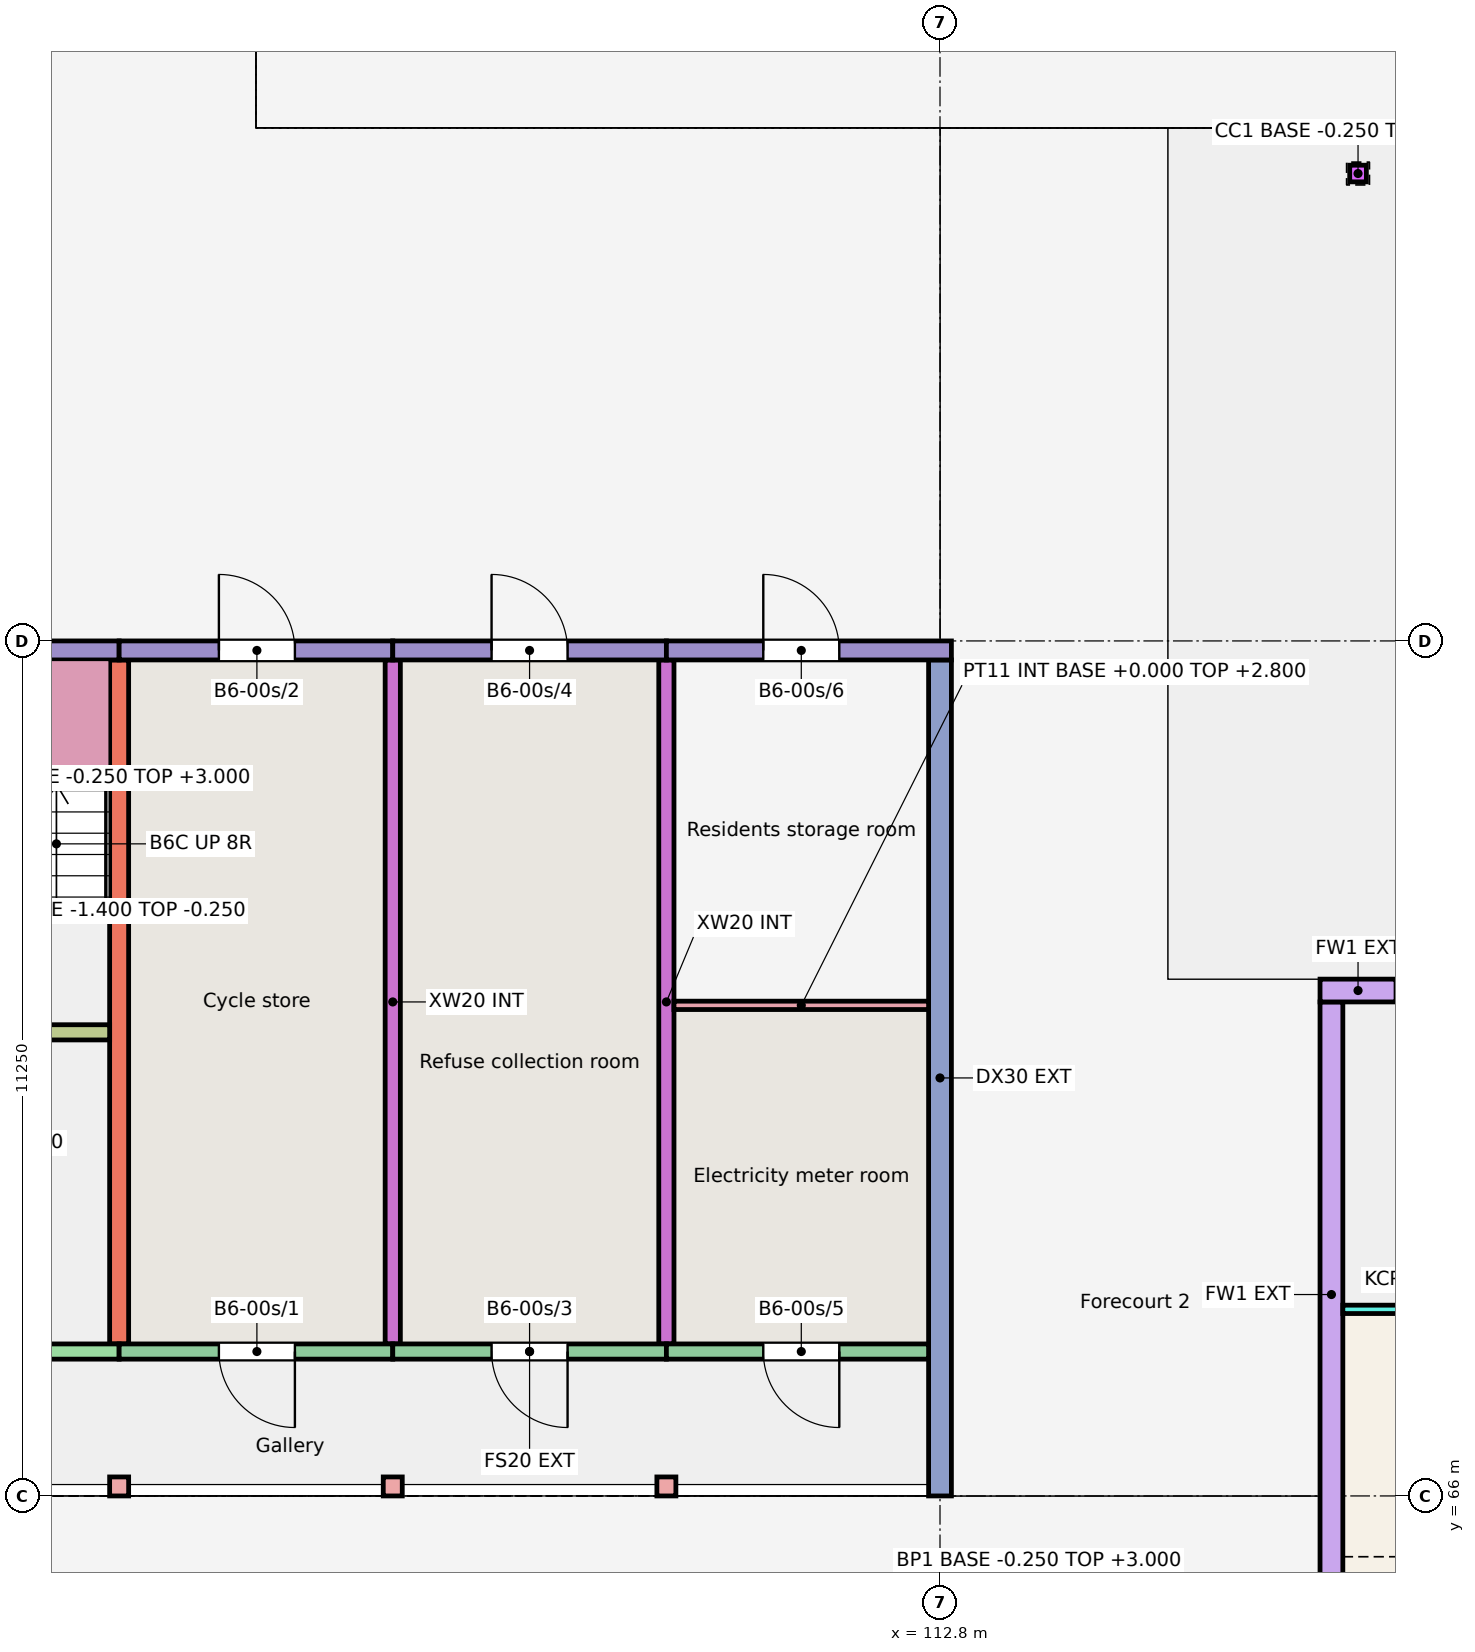
"""IFC4 building model, lengths in metres.
Left out: names, types, materials, properties, quantities, classifications, styles, units other than length and angle.
Written with IfcOpenShell. Run it as: python <this file> out.ifc"""

import sys

from ifc_helpers import new_model, si_unit, direction, frame, frame_2d, origin, origin_2d, place, context, subcontext, project, spatial, rectangle, hollow_circle, extrude, element, fill, save


model = new_model("IFC4")
c1 = context("Model", 3, precision=1e-05, world=origin(), true_north=direction((0.0, 1.0)))
c2 = subcontext(c1, "Body", "Model", "MODEL_VIEW")
j1 = project(units=[si_unit("LENGTHUNIT", "METRE"), si_unit("PLANEANGLEUNIT", "RADIAN")], contexts=[c1])
p1 = place(None, origin())
s1 = spatial("IfcSite", under=j1, at=p1, CompositionType="ELEMENT")
p2 = place(p1, origin())
s2 = spatial("IfcBuilding", under=s1, at=p2, CompositionType="ELEMENT")
p3 = place(p2, origin())
s3 = spatial("IfcBuildingStorey", under=s2, at=p3, CompositionType="ELEMENT", Elevation=0.0)
p4 = place(p3, frame((102.0, 68.0, -0.25), z_axis=(0.0, 0.0, 1.0), x_axis=(0.0, 1.0, 0.0)))
e1 = element("IfcWall", 1, at=p4, inside=s3, PredefinedType="SHEAR", context=c2, shape_type="SweptSolid", body=[
    extrude(rectangle(XDim=9.0, YDim=0.25, at=frame_2d((4.5, 0.0))), origin(), (0.0, 0.0, 1.0), 3.25),
])
for number, where, z_axis, x_axis in (
    (2, (105.6, 68.0, -0.25), (0.0, 0.0, 1.0), (0.0, 1.0, 0.0)),
    (3, (109.2, 68.0, -0.25), (0.0, 0.0, 1.0), (0.0, 1.0, 0.0)),
):
    element("IfcWall", number, at=place(p3, frame(where, z_axis=z_axis, x_axis=x_axis)), inside=s3, PredefinedType="SHEAR", context=c2, shape_type="SweptSolid", body=[
        extrude(rectangle(XDim=9.0, YDim=0.2, at=frame_2d((4.5, 0.0))), origin(), (0.0, 0.0, 1.0), 3.25),
    ])
p5 = place(p3, frame((112.8, 66.0, -0.25), z_axis=(0.0, 0.0, 1.0), x_axis=(0.0, 1.0, 0.0)))
e4 = element("IfcWall", 4, at=p5, inside=s3, PredefinedType="SHEAR", context=c2, shape_type="SweptSolid", body=[
    extrude(rectangle(XDim=11.0, YDim=0.3, at=frame_2d((5.5, 0.0))), origin(), (0.0, 0.0, 1.0), 3.25),
])
p6 = place(p3, frame((96.0, 77.125, -0.25), z_axis=(0.0, 0.0, 1.0), x_axis=(1.0, 0.0, 0.0)))
e5 = element("IfcWall", 5, at=p6, inside=s3, PredefinedType="SOLIDWALL", context=c2, shape_type="SweptSolid", body=[
    extrude(rectangle(XDim=6.0, YDim=0.25, at=frame_2d((3.0, 0.0))), origin(), (0.0, 0.0, 1.0), 3.25),
])
p7 = place(p6, frame((3.875, 0.0, 0.25)))
e6 = element("IfcOpeningElement", 6, at=p7, cuts=e5, PredefinedType="OPENING", context=c2, shape_type="SweptSolid", body=[
    extrude(rectangle(XDim=1.1, YDim=2.1, at=frame_2d((0.55, 1.05))), frame((0.0, 0.135, 0.0), z_axis=(0.0, -1.0, 0.0), x_axis=(1.0, 0.0, 0.0)), (0.0, 0.0, 1.0), 0.27),
])
p8 = place(p3, frame((96.15, 67.9, -0.25), z_axis=(0.0, 0.0, 1.0), x_axis=(1.0, 0.0, 0.0)))
e7 = element("IfcWall", 7, at=p8, inside=s3, PredefinedType="SHEAR", context=c2, shape_type="SweptSolid", body=[
    extrude(rectangle(XDim=5.85, YDim=0.2, at=frame_2d((2.925, 0.0))), origin(), (0.0, 0.0, 1.0), 3.25),
])
p9 = place(p8, frame((2.312, 0.0, 0.25)))
e8 = element("IfcOpeningElement", 8, at=p9, cuts=e7, PredefinedType="OPENING", context=c2, shape_type="SweptSolid", body=[
    extrude(rectangle(XDim=1.1, YDim=2.1, at=frame_2d((0.55, 1.05))), frame((0.0, 0.11, 0.0), z_axis=(0.0, -1.0, 0.0), x_axis=(1.0, 0.0, 0.0)), (0.0, 0.0, 1.0), 0.22),
])
p10 = place(p3, frame((96.15, 72.1, -0.25), z_axis=(0.0, 0.0, 1.0), x_axis=(1.0, 0.0, 0.0)))
e9 = element("IfcWall", 9, at=p10, inside=s3, PredefinedType="SHEAR", context=c2, shape_type="SweptSolid", body=[
    extrude(rectangle(XDim=5.725, YDim=0.2, at=frame_2d((2.863, 0.0))), origin(), (0.0, 0.0, 1.0), 3.25),
])
p11 = place(p10, frame((3.775, 0.0, 0.25)))
e10 = element("IfcOpeningElement", 10, at=p11, cuts=e9, PredefinedType="OPENING", context=c2, shape_type="SweptSolid", body=[
    extrude(rectangle(XDim=1.0, YDim=2.1, at=frame_2d((0.5, 1.05))), frame((0.0, 0.11, 0.0), z_axis=(0.0, -1.0, 0.0), x_axis=(1.0, 0.0, 0.0)), (0.0, 0.0, 1.0), 0.22),
])
p12 = place(p10, frame((0.762, 0.0, 0.25)))
e11 = element("IfcOpeningElement", 11, at=p12, cuts=e9, PredefinedType="OPENING", context=c2, shape_type="SweptSolid", body=[
    extrude(rectangle(XDim=1.1, YDim=2.1, at=frame_2d((0.55, 1.05))), frame((0.0, 0.11, 0.0), z_axis=(0.0, -1.0, 0.0), x_axis=(1.0, 0.0, 0.0)), (0.0, 0.0, 1.0), 0.22),
])
p13 = place(p3, frame((102.0, 77.125, -0.25), z_axis=(0.0, 0.0, 1.0), x_axis=(1.0, 0.0, 0.0)))
e12 = element("IfcWall", 12, at=p13, inside=s3, PredefinedType="SOLIDWALL", context=c2, shape_type="SweptSolid", body=[
    extrude(rectangle(XDim=3.6, YDim=0.25, at=frame_2d((1.8, 0.0))), origin(), (0.0, 0.0, 1.0), 3.25),
])
p14 = place(p13, frame((1.312, 0.0, 0.25)))
e13 = element("IfcOpeningElement", 13, at=p14, cuts=e12, PredefinedType="OPENING", context=c2, shape_type="SweptSolid", body=[
    extrude(rectangle(XDim=1.0, YDim=2.1, at=frame_2d((0.5, 1.05))), frame((0.0, 0.135, 0.0), z_axis=(0.0, -1.0, 0.0), x_axis=(1.0, 0.0, 0.0)), (0.0, 0.0, 1.0), 0.27),
])
p15 = place(p3, frame((102.0, 67.9, -0.25), z_axis=(0.0, 0.0, 1.0), x_axis=(1.0, 0.0, 0.0)))
e14 = element("IfcWall", 14, at=p15, inside=s3, PredefinedType="SOLIDWALL", context=c2, shape_type="SweptSolid", body=[
    extrude(rectangle(XDim=3.6, YDim=0.2, at=frame_2d((1.8, 0.0))), origin(), (0.0, 0.0, 1.0), 3.25),
])
p16 = place(p15, frame((1.312, 0.0, 0.25)))
e15 = element("IfcOpeningElement", 15, at=p16, cuts=e14, PredefinedType="OPENING", context=c2, shape_type="SweptSolid", body=[
    extrude(rectangle(XDim=1.0, YDim=2.1, at=frame_2d((0.5, 1.05))), frame((0.0, 0.11, 0.0), z_axis=(0.0, -1.0, 0.0), x_axis=(1.0, 0.0, 0.0)), (0.0, 0.0, 1.0), 0.22),
])
p17 = place(p3, frame((105.6, 77.125, -0.25), z_axis=(0.0, 0.0, 1.0), x_axis=(1.0, 0.0, 0.0)))
e16 = element("IfcWall", 16, at=p17, inside=s3, PredefinedType="SOLIDWALL", context=c2, shape_type="SweptSolid", body=[
    extrude(rectangle(XDim=3.6, YDim=0.25, at=frame_2d((1.8, 0.0))), origin(), (0.0, 0.0, 1.0), 3.25),
])
p18 = place(p17, frame((1.3, 0.0, 0.25)))
e17 = element("IfcOpeningElement", 17, at=p18, cuts=e16, PredefinedType="OPENING", context=c2, shape_type="SweptSolid", body=[
    extrude(rectangle(XDim=1.0, YDim=2.1, at=frame_2d((0.5, 1.05))), frame((0.0, 0.135, 0.0), z_axis=(0.0, -1.0, 0.0), x_axis=(1.0, 0.0, 0.0)), (0.0, 0.0, 1.0), 0.27),
])
p19 = place(p3, frame((105.6, 67.9, -0.25), z_axis=(0.0, 0.0, 1.0), x_axis=(1.0, 0.0, 0.0)))
e18 = element("IfcWall", 18, at=p19, inside=s3, PredefinedType="SOLIDWALL", context=c2, shape_type="SweptSolid", body=[
    extrude(rectangle(XDim=3.6, YDim=0.2, at=frame_2d((1.8, 0.0))), origin(), (0.0, 0.0, 1.0), 3.25),
])
p20 = place(p19, frame((1.3, 0.0, 0.25)))
e19 = element("IfcOpeningElement", 19, at=p20, cuts=e18, PredefinedType="OPENING", context=c2, shape_type="SweptSolid", body=[
    extrude(rectangle(XDim=1.0, YDim=2.1, at=frame_2d((0.5, 1.05))), frame((0.0, 0.11, 0.0), z_axis=(0.0, -1.0, 0.0), x_axis=(1.0, 0.0, 0.0)), (0.0, 0.0, 1.0), 0.22),
])
p21 = place(p3, frame((109.2, 77.125, -0.25), z_axis=(0.0, 0.0, 1.0), x_axis=(1.0, 0.0, 0.0)))
e20 = element("IfcWall", 20, at=p21, inside=s3, PredefinedType="SOLIDWALL", context=c2, shape_type="SweptSolid", body=[
    extrude(rectangle(XDim=3.75, YDim=0.25, at=frame_2d((1.875, 0.0))), origin(), (0.0, 0.0, 1.0), 3.25),
])
p22 = place(p21, frame((1.275, 0.0, 0.25)))
e21 = element("IfcOpeningElement", 21, at=p22, cuts=e20, PredefinedType="OPENING", context=c2, shape_type="SweptSolid", body=[
    extrude(rectangle(XDim=1.0, YDim=2.1, at=frame_2d((0.5, 1.05))), frame((0.0, 0.135, 0.0), z_axis=(0.0, -1.0, 0.0), x_axis=(1.0, 0.0, 0.0)), (0.0, 0.0, 1.0), 0.27),
])
p23 = place(p3, frame((109.2, 67.9, -0.25), z_axis=(0.0, 0.0, 1.0), x_axis=(1.0, 0.0, 0.0)))
e22 = element("IfcWall", 22, at=p23, inside=s3, PredefinedType="SOLIDWALL", context=c2, shape_type="SweptSolid", body=[
    extrude(rectangle(XDim=3.45, YDim=0.2, at=frame_2d((1.725, 0.0))), origin(), (0.0, 0.0, 1.0), 3.25),
])
p24 = place(p23, frame((1.275, 0.0, 0.25)))
e23 = element("IfcOpeningElement", 23, at=p24, cuts=e22, PredefinedType="OPENING", context=c2, shape_type="SweptSolid", body=[
    extrude(rectangle(XDim=1.0, YDim=2.1, at=frame_2d((0.5, 1.05))), frame((0.0, 0.11, 0.0), z_axis=(0.0, -1.0, 0.0), x_axis=(1.0, 0.0, 0.0)), (0.0, 0.0, 1.0), 0.22),
])
for number, where, z_axis, x_axis in (
    (24, (102.0, 66.125, -0.25), (0.0, 0.0, 1.0), (1.0, 0.0, 0.0)),
    (25, (105.6, 66.125, -0.25), (0.0, 0.0, 1.0), (1.0, 0.0, 0.0)),
    (26, (109.2, 66.125, -0.25), (0.0, 0.0, 1.0), (1.0, 0.0, 0.0)),
):
    element("IfcColumn", number, at=place(p3, frame(where, z_axis=z_axis, x_axis=x_axis)), inside=s3, PredefinedType="COLUMN", context=c2, shape_type="SweptSolid", body=[
        extrude(rectangle(XDim=0.25, YDim=0.25, at=origin_2d()), origin(), (0.0, 0.0, 1.0), 3.25),
    ])
p25 = place(p3, frame((117.95, 64.8, -0.25), z_axis=(0.0, 0.0, 1.0), x_axis=(0.0, 1.0, 0.0)))
e27 = element("IfcWall", 27, at=p25, inside=s3, PredefinedType="SOLIDWALL", context=c2, shape_type="SweptSolid", body=[
    extrude(rectangle(XDim=7.7, YDim=0.3, at=frame_2d((3.85, 0.0))), origin(), (0.0, 0.0, 1.0), 4.5),
])
p26 = place(p3, frame((117.8, 72.65, -0.25), z_axis=(0.0, 0.0, 1.0), x_axis=(1.0, 0.0, 0.0)))
e28 = element("IfcWall", 28, at=p26, inside=s3, PredefinedType="SOLIDWALL", context=c2, shape_type="SweptSolid", body=[
    extrude(rectangle(XDim=1.0, YDim=0.3, at=frame_2d((0.5, 0.0))), origin(), (0.0, 0.0, 1.0), 4.5),
])
p27 = place(p3, frame((118.3, 83.4, -0.25), z_axis=(0.0, 0.0, 1.0), x_axis=(1.0, 0.0, 0.0)))
e29 = element("IfcColumn", 29, at=p27, inside=s3, PredefinedType="COLUMN", context=c2, shape_type="SweptSolid", body=[
    extrude(hollow_circle(Radius=0.11, WallThickness=0.008, at=origin_2d()), origin(), (0.0, 0.0, 1.0), 5.532),
])
p28 = place(p3, frame((109.3, 72.455, 0.0), z_axis=(0.0, 0.0, 1.0), x_axis=(1.0, 0.0, 0.0)))
e30 = element("IfcWall", 30, at=p28, inside=s3, PredefinedType="PARTITIONING", context=c2, shape_type="SweptSolid", body=[
    extrude(rectangle(XDim=3.35, YDim=0.11, at=frame_2d((1.675, 0.0))), origin(), (0.0, 0.0, 1.0), 2.8),
])
p29 = place(p3, frame((118.1, 68.455, 0.0), z_axis=(0.0, 0.0, 1.0), x_axis=(1.0, 0.0, 0.0)))
e31 = element("IfcWall", 31, at=p29, inside=s3, PredefinedType="PARTITIONING", context=c2, shape_type="SweptSolid", body=[
    extrude(rectangle(XDim=4.31, YDim=0.11, at=frame_2d((2.155, 0.0))), origin(), (0.0, 0.0, 1.0), 4.25),
])
p30 = place(p16, origin())
e32 = element("IfcDoor", 32, at=p30, inside=s3, OperationType="SINGLE_SWING_RIGHT", PredefinedType="DOOR", context=c2, shape_type="SweptSolid", body=[
    extrude(rectangle(XDim=1.0, YDim=2.1, at=frame_2d((0.5, 1.05))), frame((0.0, 0.025, 0.0), z_axis=(0.0, -1.0, 0.0), x_axis=(1.0, 0.0, 0.0)), (0.0, 0.0, 1.0), 0.05),
])
fill(e15, e32)
p31 = place(p14, origin())
e33 = element("IfcDoor", 33, at=p31, inside=s3, OperationType="SINGLE_SWING_LEFT", PredefinedType="DOOR", context=c2, shape_type="SweptSolid", body=[
    extrude(rectangle(XDim=1.0, YDim=2.1, at=frame_2d((0.5, 1.05))), frame((0.0, 0.025, 0.0), z_axis=(0.0, -1.0, 0.0), x_axis=(1.0, 0.0, 0.0)), (0.0, 0.0, 1.0), 0.05),
])
fill(e13, e33)
p32 = place(p20, origin())
e34 = element("IfcDoor", 34, at=p32, inside=s3, OperationType="SINGLE_SWING_RIGHT", PredefinedType="DOOR", context=c2, shape_type="SweptSolid", body=[
    extrude(rectangle(XDim=1.0, YDim=2.1, at=frame_2d((0.5, 1.05))), frame((0.0, 0.025, 0.0), z_axis=(0.0, -1.0, 0.0), x_axis=(1.0, 0.0, 0.0)), (0.0, 0.0, 1.0), 0.05),
])
fill(e19, e34)
p33 = place(p18, origin())
e35 = element("IfcDoor", 35, at=p33, inside=s3, OperationType="SINGLE_SWING_LEFT", PredefinedType="DOOR", context=c2, shape_type="SweptSolid", body=[
    extrude(rectangle(XDim=1.0, YDim=2.1, at=frame_2d((0.5, 1.05))), frame((0.0, 0.025, 0.0), z_axis=(0.0, -1.0, 0.0), x_axis=(1.0, 0.0, 0.0)), (0.0, 0.0, 1.0), 0.05),
])
fill(e17, e35)
p34 = place(p24, origin())
e36 = element("IfcDoor", 36, at=p34, inside=s3, OperationType="SINGLE_SWING_RIGHT", PredefinedType="DOOR", context=c2, shape_type="SweptSolid", body=[
    extrude(rectangle(XDim=1.0, YDim=2.1, at=frame_2d((0.5, 1.05))), frame((0.0, 0.025, 0.0), z_axis=(0.0, -1.0, 0.0), x_axis=(1.0, 0.0, 0.0)), (0.0, 0.0, 1.0), 0.05),
])
fill(e23, e36)
p35 = place(p22, origin())
e37 = element("IfcDoor", 37, at=p35, inside=s3, OperationType="SINGLE_SWING_LEFT", PredefinedType="DOOR", context=c2, shape_type="SweptSolid", body=[
    extrude(rectangle(XDim=1.0, YDim=2.1, at=frame_2d((0.5, 1.05))), frame((0.0, 0.025, 0.0), z_axis=(0.0, -1.0, 0.0), x_axis=(1.0, 0.0, 0.0)), (0.0, 0.0, 1.0), 0.05),
])
fill(e21, e37)
save(model, sys.argv[1])
